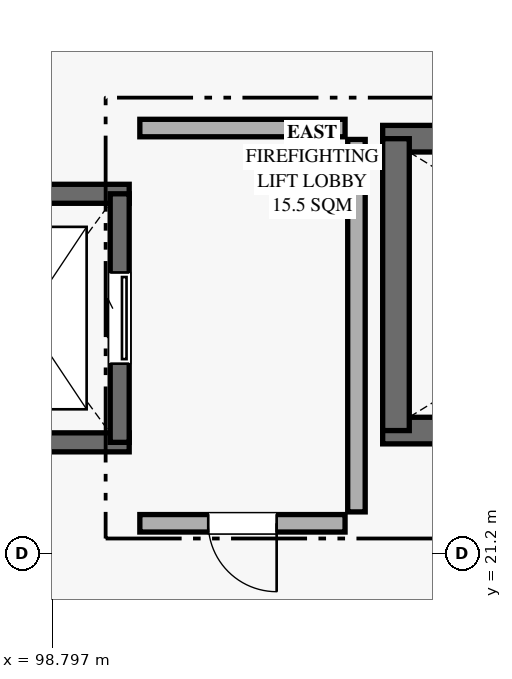
"""IFC4 building model, lengths in metres.
Left out: names, types, materials, properties, quantities, classifications, styles, units other than length and angle.
Written with IfcOpenShell. Run it as: python <this file> out.ifc"""

import sys

from ifc_helpers import new_model, si_unit, direction, frame, frame_2d, origin, place, context, subcontext, project, spatial, rectangle, extrude, element, fill, save


model = new_model("IFC4")
c1 = context("Model", 3, precision=1e-05, world=origin(), true_north=direction((0.0, 1.0)))
c2 = subcontext(c1, "Body", "Model", "MODEL_VIEW")
j1 = project(units=[si_unit("LENGTHUNIT", "METRE"), si_unit("PLANEANGLEUNIT", "RADIAN")], contexts=[c1])
p1 = place(None, origin())
s1 = spatial("IfcSite", under=j1, at=p1, CompositionType="ELEMENT")
p2 = place(p1, origin())
s2 = spatial("IfcBuilding", under=s1, at=p2, CompositionType="ELEMENT")
p3 = place(p2, frame((0.0, 0.0, 19.8)))
s3 = spatial("IfcBuildingStorey", under=s2, at=p3, CompositionType="ELEMENT", Elevation=19.8)
for number, where, z_axis, x_axis in (
    (1, (111.155, 22.82, 0.0), (0.0, 0.0, 1.0), (-1.0, 0.0, 0.0)),
    (2, (103.145, 26.66, 0.0), (0.0, 0.0, 1.0), (1.0, 0.0, 0.0)),
):
    element("IfcWall", number, at=place(p3, frame(where, z_axis=z_axis, x_axis=x_axis)), inside=s3, PredefinedType="SHEAR", context=c2, shape_type="SweptSolid", body=[
        extrude(rectangle(XDim=8.01, YDim=0.35, at=frame_2d((4.005, 0.0))), origin(), (0.0, 0.0, 1.0), 4.23),
    ])
p4 = place(p3, frame((103.32, 22.82, 0.0), z_axis=(0.0, 0.0, 1.0), x_axis=(0.0, 1.0, 0.0)))
e3 = element("IfcWall", 3, at=p4, inside=s3, PredefinedType="SHEAR", context=c2, shape_type="SweptSolid", body=[
    extrude(rectangle(XDim=3.84, YDim=0.35, at=frame_2d((1.92, 0.0))), origin(), (0.0, 0.0, 1.0), 4.23),
])
for number, where, z_axis, x_axis in (
    (4, (99.81, 22.665, 0.0), (0.0, 0.0, 1.0), (-1.0, 0.0, 0.0)),
    (5, (97.09, 25.935, 0.0), (0.0, 0.0, 1.0), (1.0, 0.0, 0.0)),
):
    element("IfcWall", number, at=place(p3, frame(where, z_axis=z_axis, x_axis=x_axis)), inside=s3, PredefinedType="SHEAR", context=c2, shape_type="SweptSolid", body=[
        extrude(rectangle(XDim=2.72, YDim=0.25, at=frame_2d((1.36, 0.0))), origin(), (0.0, 0.0, 1.0), 4.23),
    ])
p5 = place(p3, frame((99.685, 25.935, 0.0), z_axis=(0.0, 0.0, 1.0), x_axis=(0.0, -1.0, 0.0)))
e6 = element("IfcWall", 6, at=p5, inside=s3, PredefinedType="SHEAR", context=c2, shape_type="SweptSolid", body=[
    extrude(rectangle(XDim=3.27, YDim=0.25, at=frame_2d((1.635, 0.0))), origin(), (0.0, 0.0, 1.0), 4.23),
])
p6 = place(p5, frame((1.035, 0.0, 0.0)))
e7 = element("IfcOpeningElement", 7, at=p6, cuts=e6, PredefinedType="OPENING", context=c2, shape_type="SweptSolid", body=[
    extrude(rectangle(XDim=1.2, YDim=2.25, at=frame_2d((0.6, 1.125))), frame((0.0, 0.135, 0.0), z_axis=(0.0, -1.0, 0.0), x_axis=(1.0, 0.0, 0.0)), (0.0, 0.0, 1.0), 0.27),
])
p7 = place(p3, frame((102.65, 21.6, 0.0), z_axis=(0.0, 0.0, 1.0), x_axis=(-1.0, 0.0, 0.0)))
e8 = element("IfcWall", 8, at=p7, inside=s3, PredefinedType="PARTITIONING", context=c2, shape_type="SweptSolid", body=[
    extrude(rectangle(XDim=2.7, YDim=0.23, at=frame_2d((1.35, 0.0))), origin(), (0.0, 0.0, 1.0), 2.98),
])
p8 = place(p7, frame((0.9, 0.0, 0.0)))
e9 = element("IfcOpeningElement", 9, at=p8, cuts=e8, PredefinedType="OPENING", context=c2, shape_type="SweptSolid", body=[
    extrude(rectangle(XDim=0.9, YDim=2.06, at=frame_2d((0.45, 1.03))), frame((0.0, 0.125, 0.0), z_axis=(0.0, -1.0, 0.0), x_axis=(1.0, 0.0, 0.0)), (0.0, 0.0, 1.0), 0.25),
])
p9 = place(p3, frame((99.95, 26.8, 0.0), z_axis=(0.0, 0.0, 1.0), x_axis=(1.0, 0.0, 0.0)))
e10 = element("IfcWall", 10, at=p9, inside=s3, PredefinedType="PARTITIONING", context=c2, shape_type="SweptSolid", body=[
    extrude(rectangle(XDim=2.7, YDim=0.23, at=frame_2d((1.35, 0.0))), origin(), (0.0, 0.0, 1.0), 2.98),
])
p10 = place(p3, frame((102.8, 26.65, 0.0), z_axis=(0.0, 0.0, 1.0), x_axis=(0.0, -1.0, 0.0)))
e11 = element("IfcWall", 11, at=p10, inside=s3, PredefinedType="PARTITIONING", context=c2, shape_type="SweptSolid", body=[
    extrude(rectangle(XDim=4.9, YDim=0.23, at=frame_2d((2.45, 0.0))), origin(), (0.0, 0.0, 1.0), 2.98),
])
p11 = place(p6, origin())
e12 = element("IfcDoor", 12, at=p11, inside=s3, OperationType="SLIDING_TO_LEFT", PredefinedType="DOOR", context=c2, shape_type="SweptSolid", body=[
    extrude(rectangle(XDim=1.2, YDim=2.25, at=frame_2d((0.6, 1.125))), frame((0.0, 0.025, 0.0), z_axis=(0.0, -1.0, 0.0), x_axis=(1.0, 0.0, 0.0)), (0.0, 0.0, 1.0), 0.05),
])
fill(e7, e12)
p12 = place(p8, origin())
e13 = element("IfcDoor", 13, at=p12, inside=s3, OperationType="SINGLE_SWING_LEFT", PredefinedType="DOOR", context=c2, shape_type="SweptSolid", body=[
    extrude(rectangle(XDim=0.9, YDim=2.06, at=frame_2d((0.45, 1.03))), frame((0.0, 0.025, 0.0), z_axis=(0.0, -1.0, 0.0), x_axis=(1.0, 0.0, 0.0)), (0.0, 0.0, 1.0), 0.05),
])
fill(e9, e13)
save(model, sys.argv[1])
